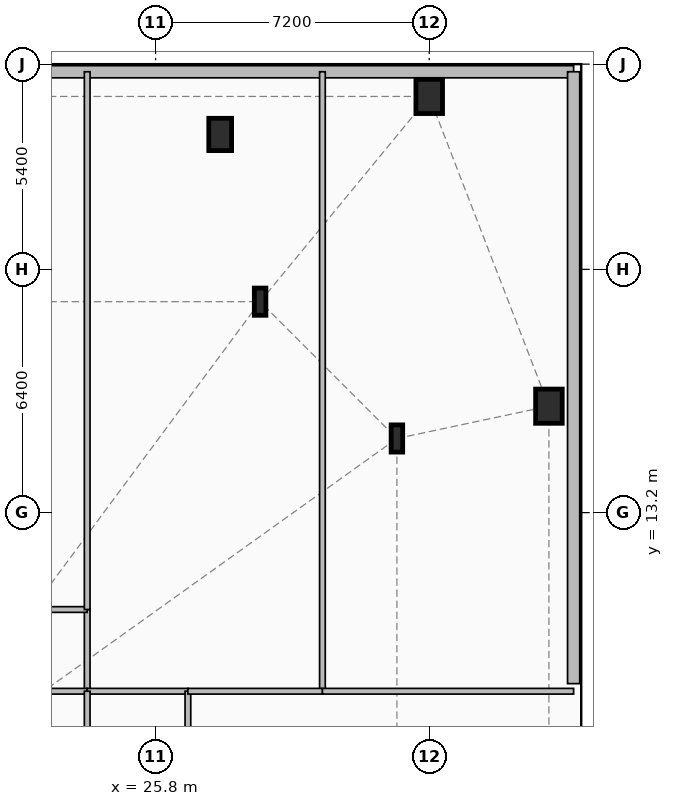
"""IFC4 building model, lengths in metres.
Left out: names, types, materials, properties, quantities, classifications, styles, units other than length and angle.
Written with IfcOpenShell. Run it as: python <this file> out.ifc"""

import sys

from ifc_helpers import new_model, si_unit, direction, frame, frame_2d, origin, origin_2d, place, context, subcontext, project, spatial, rectangle, i_section, extrude, element, fill, save


model = new_model("IFC4")
c1 = context("Model", 3, precision=1e-05, world=origin(), true_north=direction((0.0, 1.0)))
c2 = subcontext(c1, "Body", "Model", "MODEL_VIEW")
j1 = project(units=[si_unit("LENGTHUNIT", "METRE"), si_unit("PLANEANGLEUNIT", "RADIAN")], contexts=[c1])
p1 = place(None, origin())
s1 = spatial("IfcSite", under=j1, at=p1, CompositionType="ELEMENT")
p2 = place(p1, origin())
s2 = spatial("IfcBuilding", under=s1, at=p2, CompositionType="ELEMENT")
p3 = place(p2, frame((0.0, 0.0, 22.5)))
s3 = spatial("IfcBuildingStorey", under=s2, at=p3, CompositionType="ELEMENT", Elevation=22.5)
for number, where, z_axis, x_axis in (
    (1, (33.0, 24.15, 0.0), (0.0, 0.0, 1.0), (1.0, 0.0, 0.0)),
    (2, (36.15, 16.0, 0.0), (0.0, 0.0, 1.0), (1.0, 0.0, 0.0)),
):
    element("IfcColumn", number, at=place(p3, frame(where, z_axis=z_axis, x_axis=x_axis)), inside=s3, PredefinedType="COLUMN", context=c2, shape_type="SweptSolid", body=[
        extrude(rectangle(XDim=0.7, YDim=0.9, at=origin_2d()), origin(), (0.0, 0.0, 1.0), 4.5),
    ])
p4 = place(p3, frame((27.5, 23.15, 0.0), z_axis=(0.0, 0.0, 1.0), x_axis=(1.0, 0.0, 0.0)))
e3 = element("IfcColumn", 3, at=p4, inside=s3, PredefinedType="PILASTER", context=c2, shape_type="SweptSolid", body=[
    extrude(rectangle(XDim=0.6, YDim=0.85, at=origin_2d()), origin(), (0.0, 0.0, 1.0), 4.5),
])
for number, where, z_axis, x_axis in (
    (4, (28.55, 18.75, 0.0), (0.0, 0.0, 1.0), (1.0, 0.0, 0.0)),
    (5, (32.15, 15.15, 0.0), (0.0, 0.0, 1.0), (1.0, 0.0, 0.0)),
):
    element("IfcColumn", number, at=place(p3, frame(where, z_axis=z_axis, x_axis=x_axis)), inside=s3, PredefinedType="COLUMN", context=c2, shape_type="SweptSolid", body=[
        extrude(i_section(OverallWidth=0.304, OverallDepth=0.716, WebThickness=0.021, FlangeThickness=0.04, FilletRadius=0.027, at=origin_2d()), origin(), (0.0, 0.0, 1.0), 4.5),
    ])
p5 = place(p3, frame((-36.8, 24.8, 0.0), z_axis=(0.0, 0.0, 1.0), x_axis=(1.0, 0.0, 0.0)))
e6 = element("IfcWall", 6, at=p5, inside=s3, PredefinedType="SOLIDWALL", context=c2, shape_type="SweptSolid", body=[
    extrude(rectangle(XDim=73.6, YDim=0.32, at=frame_2d((36.8, 0.0))), origin(), (0.0, 0.0, 1.0), 4.16),
])
p6 = place(p5, frame((1.079, 0.0, 0.85)))
e7 = element("IfcOpeningElement", 7, at=p6, cuts=e6, PredefinedType="OPENING", context=c2, shape_type="SweptSolid", body=[
    extrude(rectangle(XDim=2.3, YDim=2.4, at=frame_2d((1.15, 1.2))), frame((0.0, 0.17, 0.0), z_axis=(0.0, -1.0, 0.0), x_axis=(1.0, 0.0, 0.0)), (0.0, 0.0, 1.0), 0.34),
])
p7 = place(p5, frame((8.431, 0.0, 0.85)))
e8 = element("IfcOpeningElement", 8, at=p7, cuts=e6, PredefinedType="OPENING", context=c2, shape_type="SweptSolid", body=[
    extrude(rectangle(XDim=2.6, YDim=2.4, at=frame_2d((1.3, 1.2))), frame((0.0, 0.17, 0.0), z_axis=(0.0, -1.0, 0.0), x_axis=(1.0, 0.0, 0.0)), (0.0, 0.0, 1.0), 0.34),
])
p8 = place(p5, frame((13.316, 0.0, 0.85)))
e9 = element("IfcOpeningElement", 9, at=p8, cuts=e6, PredefinedType="OPENING", context=c2, shape_type="SweptSolid", body=[
    extrude(rectangle(XDim=1.1, YDim=1.85, at=frame_2d((0.55, 0.925))), frame((0.0, 0.17, 0.0), z_axis=(0.0, -1.0, 0.0), x_axis=(1.0, 0.0, 0.0)), (0.0, 0.0, 1.0), 0.34),
])
p9 = place(p5, frame((16.339, 0.0, 0.85)))
e10 = element("IfcOpeningElement", 10, at=p9, cuts=e6, PredefinedType="OPENING", context=c2, shape_type="SweptSolid", body=[
    extrude(rectangle(XDim=2.0, YDim=2.4, at=frame_2d((1.0, 1.2))), frame((0.0, 0.17, 0.0), z_axis=(0.0, -1.0, 0.0), x_axis=(1.0, 0.0, 0.0)), (0.0, 0.0, 1.0), 0.34),
])
p10 = place(p5, frame((21.875, 0.0, 0.85)))
e11 = element("IfcOpeningElement", 11, at=p10, cuts=e6, PredefinedType="OPENING", context=c2, shape_type="SweptSolid", body=[
    extrude(rectangle(XDim=2.3, YDim=2.4, at=frame_2d((1.15, 1.2))), frame((0.0, 0.17, 0.0), z_axis=(0.0, -1.0, 0.0), x_axis=(1.0, 0.0, 0.0)), (0.0, 0.0, 1.0), 0.34),
])
p11 = place(p5, frame((26.53, 0.0, 0.85)))
e12 = element("IfcOpeningElement", 12, at=p11, cuts=e6, PredefinedType="OPENING", context=c2, shape_type="SweptSolid", body=[
    extrude(rectangle(XDim=2.6, YDim=2.4, at=frame_2d((1.3, 1.2))), frame((0.0, 0.17, 0.0), z_axis=(0.0, -1.0, 0.0), x_axis=(1.0, 0.0, 0.0)), (0.0, 0.0, 1.0), 0.34),
])
p12 = place(p5, frame((32.537, 0.0, 0.85)))
e13 = element("IfcOpeningElement", 13, at=p12, cuts=e6, PredefinedType="OPENING", context=c2, shape_type="SweptSolid", body=[
    extrude(rectangle(XDim=2.6, YDim=2.4, at=frame_2d((1.3, 1.2))), frame((0.0, 0.17, 0.0), z_axis=(0.0, -1.0, 0.0), x_axis=(1.0, 0.0, 0.0)), (0.0, 0.0, 1.0), 0.34),
])
p13 = place(p5, frame((38.543, 0.0, 0.85)))
e14 = element("IfcOpeningElement", 14, at=p13, cuts=e6, PredefinedType="OPENING", context=c2, shape_type="SweptSolid", body=[
    extrude(rectangle(XDim=2.6, YDim=2.4, at=frame_2d((1.3, 1.2))), frame((0.0, 0.17, 0.0), z_axis=(0.0, -1.0, 0.0), x_axis=(1.0, 0.0, 0.0)), (0.0, 0.0, 1.0), 0.34),
])
p14 = place(p5, frame((44.55, 0.0, 0.85)))
e15 = element("IfcOpeningElement", 15, at=p14, cuts=e6, PredefinedType="OPENING", context=c2, shape_type="SweptSolid", body=[
    extrude(rectangle(XDim=2.6, YDim=2.4, at=frame_2d((1.3, 1.2))), frame((0.0, 0.17, 0.0), z_axis=(0.0, -1.0, 0.0), x_axis=(1.0, 0.0, 0.0)), (0.0, 0.0, 1.0), 0.34),
])
p15 = place(p5, frame((50.556, 0.0, 0.85)))
e16 = element("IfcOpeningElement", 16, at=p15, cuts=e6, PredefinedType="OPENING", context=c2, shape_type="SweptSolid", body=[
    extrude(rectangle(XDim=2.6, YDim=2.4, at=frame_2d((1.3, 1.2))), frame((0.0, 0.17, 0.0), z_axis=(0.0, -1.0, 0.0), x_axis=(1.0, 0.0, 0.0)), (0.0, 0.0, 1.0), 0.34),
])
p16 = place(p5, frame((55.341, 0.0, 0.85)))
e17 = element("IfcOpeningElement", 17, at=p16, cuts=e6, PredefinedType="OPENING", context=c2, shape_type="SweptSolid", body=[
    extrude(rectangle(XDim=2.0, YDim=2.4, at=frame_2d((1.0, 1.2))), frame((0.0, 0.17, 0.0), z_axis=(0.0, -1.0, 0.0), x_axis=(1.0, 0.0, 0.0)), (0.0, 0.0, 1.0), 0.34),
])
p17 = place(p5, frame((59.16, 0.0, 0.85)))
e18 = element("IfcOpeningElement", 18, at=p17, cuts=e6, PredefinedType="OPENING", context=c2, shape_type="SweptSolid", body=[
    extrude(rectangle(XDim=1.1, YDim=1.85, at=frame_2d((0.55, 0.925))), frame((0.0, 0.17, 0.0), z_axis=(0.0, -1.0, 0.0), x_axis=(1.0, 0.0, 0.0)), (0.0, 0.0, 1.0), 0.34),
])
p18 = place(p5, frame((62.649, 0.0, 0.85)))
e19 = element("IfcOpeningElement", 19, at=p18, cuts=e6, PredefinedType="OPENING", context=c2, shape_type="SweptSolid", body=[
    extrude(rectangle(XDim=2.6, YDim=2.4, at=frame_2d((1.3, 1.2))), frame((0.0, 0.17, 0.0), z_axis=(0.0, -1.0, 0.0), x_axis=(1.0, 0.0, 0.0)), (0.0, 0.0, 1.0), 0.34),
])
p19 = place(p5, frame((70.301, 0.0, 0.85)))
e20 = element("IfcOpeningElement", 20, at=p19, cuts=e6, PredefinedType="OPENING", context=c2, shape_type="SweptSolid", body=[
    extrude(rectangle(XDim=2.3, YDim=2.4, at=frame_2d((1.15, 1.2))), frame((0.0, 0.17, 0.0), z_axis=(0.0, -1.0, 0.0), x_axis=(1.0, 0.0, 0.0)), (0.0, 0.0, 1.0), 0.34),
])
p20 = place(p3, frame((36.8, 24.8, 0.0), z_axis=(0.0, 0.0, 1.0), x_axis=(0.0, -1.0, 0.0)))
e21 = element("IfcWall", 21, at=p20, inside=s3, PredefinedType="SOLIDWALL", context=c2, shape_type="SweptSolid", body=[
    extrude(rectangle(XDim=16.1, YDim=0.32, at=frame_2d((8.05, 0.0))), origin(), (0.0, 0.0, 1.0), 4.16),
])
p21 = place(p20, frame((5.067, 0.0, 0.85)))
e22 = element("IfcOpeningElement", 22, at=p21, cuts=e21, PredefinedType="OPENING", context=c2, shape_type="SweptSolid", body=[
    extrude(rectangle(XDim=2.6, YDim=2.4, at=frame_2d((1.3, 1.2))), frame((0.0, 0.17, 0.0), z_axis=(0.0, -1.0, 0.0), x_axis=(1.0, 0.0, 0.0)), (0.0, 0.0, 1.0), 0.34),
])
p22 = place(p3, frame((24.0, 10.65, 0.0), z_axis=(0.0, 0.0, 1.0), x_axis=(0.0, -1.0, 0.0)))
e23 = element("IfcWall", 23, at=p22, inside=s3, PredefinedType="PARTITIONING", context=c2, shape_type="SweptSolid", body=[
    extrude(rectangle(XDim=2.15, YDim=0.15, at=frame_2d((1.075, 0.0))), origin(), (0.0, 0.0, 1.0), 4.16),
])
p23 = place(p22, frame((0.625, 0.0, 0.0)))
e24 = element("IfcOpeningElement", 24, at=p23, cuts=e23, PredefinedType="OPENING", context=c2, shape_type="SweptSolid", body=[
    extrude(rectangle(XDim=0.9, YDim=2.1, at=frame_2d((0.45, 1.05))), frame((0.0, 0.085, 0.0), z_axis=(0.0, -1.0, 0.0), x_axis=(1.0, 0.0, 0.0)), (0.0, 0.0, 1.0), 0.17),
])
p24 = place(p3, frame((24.0, 8.5, 0.0), z_axis=(0.0, 0.0, 1.0), x_axis=(-1.0, 0.0, 0.0)))
e25 = element("IfcWall", 25, at=p24, inside=s3, PredefinedType="PARTITIONING", context=c2, shape_type="SweptSolid", body=[
    extrude(rectangle(XDim=5.2, YDim=0.15, at=frame_2d((2.6, 0.0))), origin(), (0.0, 0.0, 1.0), 4.16),
])
p25 = place(p24, frame((0.954, 0.0, 0.0)))
e26 = element("IfcOpeningElement", 26, at=p25, cuts=e25, PredefinedType="OPENING", context=c2, shape_type="SweptSolid", body=[
    extrude(rectangle(XDim=1.05, YDim=2.15, at=frame_2d((0.525, 1.075))), frame((0.0, 0.085, 0.0), z_axis=(0.0, -1.0, 0.0), x_axis=(1.0, 0.0, 0.0)), (0.0, 0.0, 1.0), 0.17),
])
p26 = place(p3, frame((21.0, 10.65, 0.0), z_axis=(0.0, 0.0, 1.0), x_axis=(1.0, 0.0, 0.0)))
e27 = element("IfcWall", 27, at=p26, inside=s3, PredefinedType="PARTITIONING", context=c2, shape_type="SweptSolid", body=[
    extrude(rectangle(XDim=3.0, YDim=0.15, at=frame_2d((1.5, 0.0))), origin(), (0.0, 0.0, 1.0), 4.16),
])
p27 = place(p26, frame((1.271, 0.0, 0.0)))
e28 = element("IfcOpeningElement", 28, at=p27, cuts=e27, PredefinedType="OPENING", context=c2, shape_type="SweptSolid", body=[
    extrude(rectangle(XDim=1.05, YDim=2.15, at=frame_2d((0.525, 1.075))), frame((0.0, 0.085, 0.0), z_axis=(0.0, -1.0, 0.0), x_axis=(1.0, 0.0, 0.0)), (0.0, 0.0, 1.0), 0.17),
])
p28 = place(p3, frame((24.0, 8.5, 0.0), z_axis=(0.0, 0.0, 1.0), x_axis=(1.0, 0.0, 0.0)))
e29 = element("IfcWall", 29, at=p28, inside=s3, PredefinedType="PARTITIONING", context=c2, shape_type="SweptSolid", body=[
    extrude(rectangle(XDim=2.65, YDim=0.15, at=frame_2d((1.325, 0.0))), origin(), (0.0, 0.0, 1.0), 4.16),
])
p29 = place(p28, frame((0.965, 0.0, 0.0)))
e30 = element("IfcOpeningElement", 30, at=p29, cuts=e29, PredefinedType="OPENING", context=c2, shape_type="SweptSolid", body=[
    extrude(rectangle(XDim=1.05, YDim=2.15, at=frame_2d((0.525, 1.075))), frame((0.0, 0.085, 0.0), z_axis=(0.0, -1.0, 0.0), x_axis=(1.0, 0.0, 0.0)), (0.0, 0.0, 1.0), 0.17),
])
p30 = place(p3, frame((26.65, 8.5, 0.0), z_axis=(0.0, 0.0, 1.0), x_axis=(0.0, -1.0, 0.0)))
e31 = element("IfcWall", 31, at=p30, inside=s3, PredefinedType="PARTITIONING", context=c2, shape_type="SweptSolid", body=[
    extrude(rectangle(XDim=2.115, YDim=0.15, at=frame_2d((1.058, 0.0))), origin(), (0.0, 0.0, 1.0), 4.16),
])
p31 = place(p30, frame((0.583, 0.0, 0.0)))
e32 = element("IfcOpeningElement", 32, at=p31, cuts=e31, PredefinedType="OPENING", context=c2, shape_type="SweptSolid", body=[
    extrude(rectangle(XDim=0.95, YDim=2.1, at=frame_2d((0.475, 1.05))), frame((0.0, 0.085, 0.0), z_axis=(0.0, -1.0, 0.0), x_axis=(1.0, 0.0, 0.0)), (0.0, 0.0, 1.0), 0.17),
])
p32 = place(p3, frame((24.0, -5.6, 0.0), z_axis=(0.0, 0.0, 1.0), x_axis=(0.0, 1.0, 0.0)))
e33 = element("IfcWall", 33, at=p32, inside=s3, PredefinedType="PARTITIONING", context=c2, shape_type="SweptSolid", body=[
    extrude(rectangle(XDim=14.1, YDim=0.15, at=frame_2d((7.05, 0.0))), origin(), (0.0, 0.0, 1.0), 4.16),
])
p33 = place(p3, frame((30.19, 24.8, 0.0), z_axis=(0.0, 0.0, 1.0), x_axis=(0.0, -1.0, 0.0)))
e34 = element("IfcWall", 34, at=p33, inside=s3, PredefinedType="PARTITIONING", context=c2, shape_type="SweptSolid", body=[
    extrude(rectangle(XDim=16.3, YDim=0.15, at=frame_2d((8.15, 0.0))), origin(), (0.0, 0.0, 1.0), 4.16),
])
p34 = place(p33, frame((12.909, 0.0, 0.0)))
e35 = element("IfcOpeningElement", 35, at=p34, cuts=e34, PredefinedType="OPENING", context=c2, shape_type="SweptSolid", body=[
    extrude(rectangle(XDim=1.05, YDim=2.15, at=frame_2d((0.525, 1.075))), frame((0.0, 0.085, 0.0), z_axis=(0.0, -1.0, 0.0), x_axis=(1.0, 0.0, 0.0)), (0.0, 0.0, 1.0), 0.17),
])
p35 = place(p3, frame((30.19, 8.5, 0.0), z_axis=(0.0, 0.0, 1.0), x_axis=(-1.0, 0.0, 0.0)))
e36 = element("IfcWall", 36, at=p35, inside=s3, PredefinedType="PARTITIONING", context=c2, shape_type="SweptSolid", body=[
    extrude(rectangle(XDim=3.54, YDim=0.15, at=frame_2d((1.77, 0.0))), origin(), (0.0, 0.0, 1.0), 4.16),
])
p36 = place(p3, frame((24.0, 10.65, 0.0), z_axis=(0.0, 0.0, 1.0), x_axis=(0.0, 1.0, 0.0)))
e37 = element("IfcWall", 37, at=p36, inside=s3, PredefinedType="PARTITIONING", context=c2, shape_type="SweptSolid", body=[
    extrude(rectangle(XDim=14.15, YDim=0.15, at=frame_2d((7.075, 0.0))), origin(), (0.0, 0.0, 1.0), 4.16),
])
p37 = place(p3, frame((36.8, 8.5, 0.0), z_axis=(0.0, 0.0, 1.0), x_axis=(-1.0, 0.0, 0.0)))
e38 = element("IfcWall", 38, at=p37, inside=s3, PredefinedType="PARTITIONING", context=c2, shape_type="SweptSolid", body=[
    extrude(rectangle(XDim=6.61, YDim=0.15, at=frame_2d((3.305, 0.0))), origin(), (0.0, 0.0, 1.0), 4.16),
])
p38 = place(p17, origin())
e39 = element("IfcWindow", 39, at=p38, inside=s3, PartitioningType="SINGLE_PANEL", PredefinedType="WINDOW", context=c2, shape_type="SweptSolid", body=[
    extrude(rectangle(XDim=1.1, YDim=1.85, at=frame_2d((0.55, 0.925))), frame((0.0, 0.03, 0.0), z_axis=(0.0, -1.0, 0.0), x_axis=(1.0, 0.0, 0.0)), (0.0, 0.0, 1.0), 0.06),
])
fill(e18, e39)
p39 = place(p18, origin())
e40 = element("IfcWindow", 40, at=p39, inside=s3, PartitioningType="SINGLE_PANEL", PredefinedType="WINDOW", context=c2, shape_type="SweptSolid", body=[
    extrude(rectangle(XDim=2.6, YDim=2.4, at=frame_2d((1.3, 1.2))), frame((0.0, 0.03, 0.0), z_axis=(0.0, -1.0, 0.0), x_axis=(1.0, 0.0, 0.0)), (0.0, 0.0, 1.0), 0.06),
])
fill(e19, e40)
p40 = place(p19, origin())
e41 = element("IfcWindow", 41, at=p40, inside=s3, PartitioningType="SINGLE_PANEL", PredefinedType="WINDOW", context=c2, shape_type="SweptSolid", body=[
    extrude(rectangle(XDim=2.3, YDim=2.4, at=frame_2d((1.15, 1.2))), frame((0.0, 0.03, 0.0), z_axis=(0.0, -1.0, 0.0), x_axis=(1.0, 0.0, 0.0)), (0.0, 0.0, 1.0), 0.06),
])
fill(e20, e41)
p41 = place(p21, origin())
e42 = element("IfcWindow", 42, at=p41, inside=s3, PartitioningType="SINGLE_PANEL", PredefinedType="WINDOW", context=c2, shape_type="SweptSolid", body=[
    extrude(rectangle(XDim=2.6, YDim=2.4, at=frame_2d((1.3, 1.2))), frame((0.0, 0.03, 0.0), z_axis=(0.0, -1.0, 0.0), x_axis=(1.0, 0.0, 0.0)), (0.0, 0.0, 1.0), 0.06),
])
fill(e22, e42)
p42 = place(p23, origin())
e43 = element("IfcDoor", 43, at=p42, inside=s3, OperationType="SINGLE_SWING_LEFT", PredefinedType="DOOR", context=c2, shape_type="SweptSolid", body=[
    extrude(rectangle(XDim=0.9, YDim=2.1, at=frame_2d((0.45, 1.05))), frame((0.0, 0.025, 0.0), z_axis=(0.0, -1.0, 0.0), x_axis=(1.0, 0.0, 0.0)), (0.0, 0.0, 1.0), 0.05),
])
fill(e24, e43)
p43 = place(p27, origin())
e44 = element("IfcDoor", 44, at=p43, inside=s3, OperationType="SINGLE_SWING_LEFT", PredefinedType="DOOR", context=c2, shape_type="SweptSolid", body=[
    extrude(rectangle(XDim=1.05, YDim=2.15, at=frame_2d((0.525, 1.075))), frame((0.0, 0.025, 0.0), z_axis=(0.0, -1.0, 0.0), x_axis=(1.0, 0.0, 0.0)), (0.0, 0.0, 1.0), 0.05),
])
fill(e28, e44)
p44 = place(p29, origin())
e45 = element("IfcDoor", 45, at=p44, inside=s3, OperationType="SINGLE_SWING_RIGHT", PredefinedType="DOOR", context=c2, shape_type="SweptSolid", body=[
    extrude(rectangle(XDim=1.05, YDim=2.15, at=frame_2d((0.525, 1.075))), frame((0.0, 0.025, 0.0), z_axis=(0.0, -1.0, 0.0), x_axis=(1.0, 0.0, 0.0)), (0.0, 0.0, 1.0), 0.05),
])
fill(e30, e45)
p45 = place(p31, origin())
e46 = element("IfcDoor", 46, at=p45, inside=s3, OperationType="SINGLE_SWING_LEFT", PredefinedType="DOOR", context=c2, shape_type="SweptSolid", body=[
    extrude(rectangle(XDim=0.95, YDim=2.1, at=frame_2d((0.475, 1.05))), frame((0.0, 0.025, 0.0), z_axis=(0.0, -1.0, 0.0), x_axis=(1.0, 0.0, 0.0)), (0.0, 0.0, 1.0), 0.05),
])
fill(e32, e46)
p46 = place(p34, origin())
e47 = element("IfcDoor", 47, at=p46, inside=s3, OperationType="SINGLE_SWING_RIGHT", PredefinedType="DOOR", context=c2, shape_type="SweptSolid", body=[
    extrude(rectangle(XDim=1.05, YDim=2.15, at=frame_2d((0.525, 1.075))), frame((0.0, 0.025, 0.0), z_axis=(0.0, -1.0, 0.0), x_axis=(1.0, 0.0, 0.0)), (0.0, 0.0, 1.0), 0.05),
])
fill(e35, e47)
save(model, sys.argv[1])
